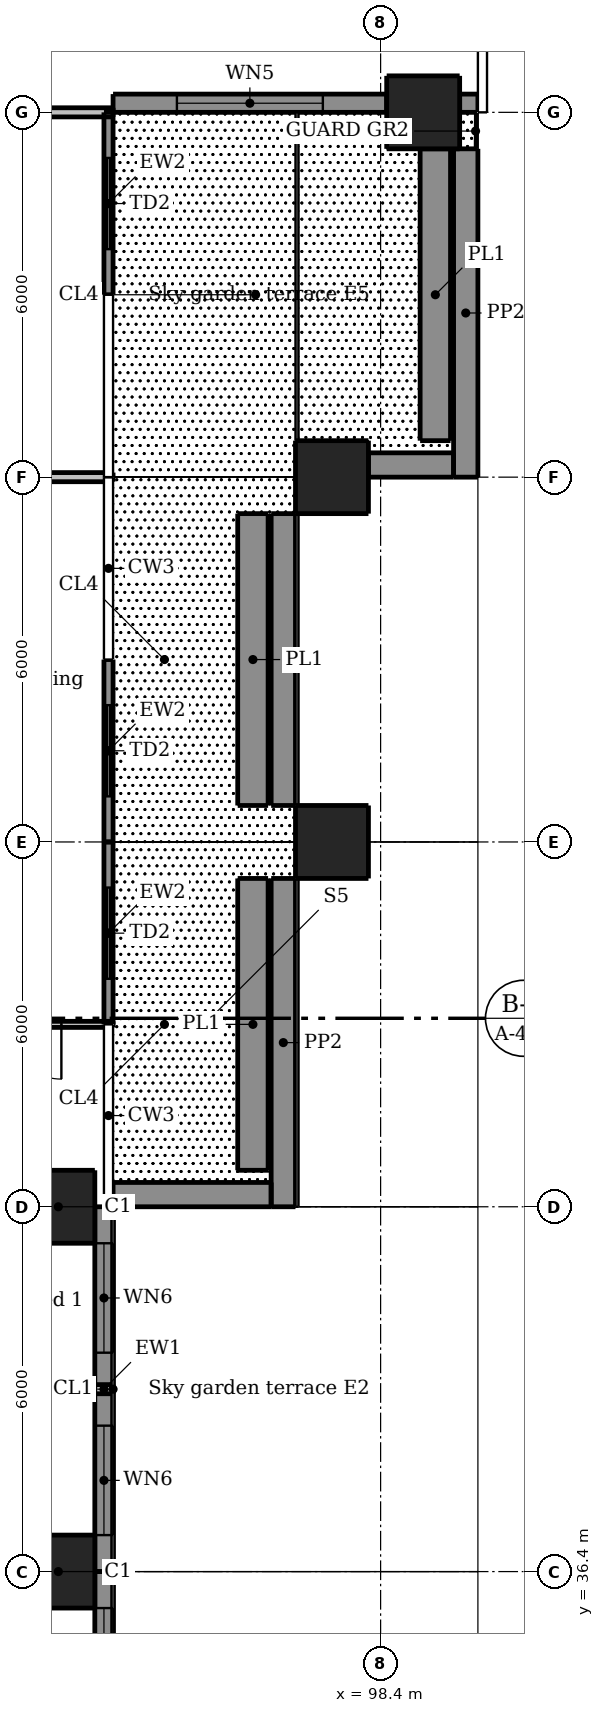
"""IFC4 building model, lengths in metres.
Left out: names, types, materials, properties, quantities, classifications, styles, units other than length and angle.
Written with IfcOpenShell. Run it as: python <this file> out.ifc"""

import sys

from ifc_helpers import new_model, si_unit, direction, frame, frame_2d, origin, origin_2d, place, context, subcontext, project, spatial, rectangle, extrude, element, fill, save


model = new_model("IFC4")
c1 = context("Model", 3, precision=1e-05, world=origin(), true_north=direction((0.0, 1.0)))
c2 = subcontext(c1, "Body", "Model", "MODEL_VIEW")
j1 = project(units=[si_unit("LENGTHUNIT", "METRE"), si_unit("PLANEANGLEUNIT", "RADIAN")], contexts=[c1])
p1 = place(None, origin())
s1 = spatial("IfcSite", under=j1, at=p1, CompositionType="ELEMENT")
p2 = place(p1, origin())
s2 = spatial("IfcBuilding", under=s1, at=p2, CompositionType="ELEMENT")
p3 = place(p2, frame((0.0, 0.0, 53.2)))
s3 = spatial("IfcBuildingStorey", under=s2, at=p3, CompositionType="ELEMENT", Elevation=53.2)
for number, where, z_axis, x_axis in (
    (1, (93.1, 36.4, 0.0), (0.0, 0.0, 1.0), (1.0, 0.0, 0.0)),
    (2, (93.1, 42.4, 0.0), (0.0, 0.0, 1.0), (1.0, 0.0, 0.0)),
):
    element("IfcColumn", number, at=place(p3, frame(where, z_axis=z_axis, x_axis=x_axis)), inside=s3, PredefinedType="COLUMN", context=c2, shape_type="SweptSolid", body=[
        extrude(rectangle(XDim=1.2, YDim=1.2, at=origin_2d()), origin(), (0.0, 0.0, 1.0), 3.05),
    ])
for number, where, z_axis, x_axis in (
    (3, (97.6, 48.4, 0.0), (0.0, 0.0, 1.0), (1.0, 0.0, 0.0)),
    (4, (97.6, 54.4, 0.0), (0.0, 0.0, 1.0), (1.0, 0.0, 0.0)),
):
    element("IfcColumn", number, at=place(p3, frame(where, z_axis=z_axis, x_axis=x_axis)), inside=s3, PredefinedType="COLUMN", context=c2, shape_type="SweptSolid", body=[
        extrude(rectangle(XDim=1.2, YDim=1.2, at=origin_2d()), origin(), (0.0, 0.0, 1.0), 3.3),
    ])
p4 = place(p3, frame((99.1, 60.4, 0.0), z_axis=(0.0, 0.0, 1.0), x_axis=(1.0, 0.0, 0.0)))
e5 = element("IfcColumn", 5, at=p4, inside=s3, PredefinedType="COLUMN", context=c2, shape_type="SweptSolid", body=[
    extrude(rectangle(XDim=1.2, YDim=1.2, at=origin_2d()), origin(), (0.0, 0.0, 1.0), 3.05),
])
p5 = place(p3, frame((94.0, 60.55, 0.0), z_axis=(0.0, 0.0, 1.0), x_axis=(1.0, 0.0, 0.0)))
e6 = element("IfcWall", 6, at=p5, inside=s3, PredefinedType="SOLIDWALL", context=c2, shape_type="SweptSolid", body=[
    extrude(rectangle(XDim=4.5, YDim=0.3, at=frame_2d((2.25, 0.0))), origin(), (0.0, 0.0, 1.0), 3.05),
])
p6 = place(p5, frame((1.05, 0.0, 0.15)))
e7 = element("IfcOpeningElement", 7, at=p6, cuts=e6, PredefinedType="OPENING", context=c2, shape_type="SweptSolid", body=[
    extrude(rectangle(XDim=2.4, YDim=2.1, at=frame_2d((1.2, 1.05))), frame((0.0, 0.16, 0.0), z_axis=(0.0, -1.0, 0.0), x_axis=(1.0, 0.0, 0.0)), (0.0, 0.0, 1.0), 0.32),
])
p7 = place(p3, frame((99.7, 60.55, 0.0), z_axis=(0.0, 0.0, 1.0), x_axis=(1.0, 0.0, 0.0)))
e8 = element("IfcWall", 8, at=p7, inside=s3, PredefinedType="SOLIDWALL", context=c2, shape_type="SweptSolid", body=[
    extrude(rectangle(XDim=0.3, YDim=0.3, at=frame_2d((0.15, 0.0))), origin(), (0.0, 0.0, 1.0), 3.05),
])
p8 = place(p3, frame((93.85, 30.1, 0.0), z_axis=(0.0, 0.0, 1.0), x_axis=(0.0, 1.0, 0.0)))
e9 = element("IfcWall", 9, at=p8, inside=s3, PredefinedType="SOLIDWALL", context=c2, shape_type="SweptSolid", body=[
    extrude(rectangle(XDim=6.3, YDim=0.3, at=frame_2d((3.15, 0.0))), origin(), (0.0, 0.0, 1.0), 3.05),
])
p9 = place(p8, frame((0.9, 0.0, 0.15)))
e10 = element("IfcOpeningElement", 10, at=p9, cuts=e9, PredefinedType="OPENING", context=c2, shape_type="SweptSolid", body=[
    extrude(rectangle(XDim=1.8, YDim=2.1, at=frame_2d((0.9, 1.05))), frame((0.0, 0.16, 0.0), z_axis=(0.0, -1.0, 0.0), x_axis=(1.0, 0.0, 0.0)), (0.0, 0.0, 1.0), 0.32),
])
p10 = place(p8, frame((3.9, 0.0, 0.15)))
e11 = element("IfcOpeningElement", 11, at=p10, cuts=e9, PredefinedType="OPENING", context=c2, shape_type="SweptSolid", body=[
    extrude(rectangle(XDim=1.8, YDim=2.1, at=frame_2d((0.9, 1.05))), frame((0.0, 0.16, 0.0), z_axis=(0.0, -1.0, 0.0), x_axis=(1.0, 0.0, 0.0)), (0.0, 0.0, 1.0), 0.32),
])
p11 = place(p3, frame((93.85, 36.4, 0.0), z_axis=(0.0, 0.0, 1.0), x_axis=(0.0, 1.0, 0.0)))
e12 = element("IfcWall", 12, at=p11, inside=s3, PredefinedType="SOLIDWALL", context=c2, shape_type="SweptSolid", body=[
    extrude(rectangle(XDim=6.0, YDim=0.3, at=frame_2d((3.0, 0.0))), origin(), (0.0, 0.0, 1.0), 3.05),
])
p12 = place(p11, frame((0.6, 0.0, 0.15)))
e13 = element("IfcOpeningElement", 13, at=p12, cuts=e12, PredefinedType="OPENING", context=c2, shape_type="SweptSolid", body=[
    extrude(rectangle(XDim=1.8, YDim=2.1, at=frame_2d((0.9, 1.05))), frame((0.0, 0.16, 0.0), z_axis=(0.0, -1.0, 0.0), x_axis=(1.0, 0.0, 0.0)), (0.0, 0.0, 1.0), 0.32),
])
p13 = place(p11, frame((3.6, 0.0, 0.15)))
e14 = element("IfcOpeningElement", 14, at=p13, cuts=e12, PredefinedType="OPENING", context=c2, shape_type="SweptSolid", body=[
    extrude(rectangle(XDim=1.8, YDim=2.1, at=frame_2d((0.9, 1.05))), frame((0.0, 0.16, 0.0), z_axis=(0.0, -1.0, 0.0), x_axis=(1.0, 0.0, 0.0)), (0.0, 0.0, 1.0), 0.32),
])
p14 = place(p3, frame((93.925, 45.4, 0.0), z_axis=(0.0, 0.0, 1.0), x_axis=(0.0, 1.0, 0.0)))
e15 = element("IfcWall", 15, at=p14, inside=s3, PredefinedType="SOLIDWALL", context=c2, shape_type="SweptSolid", body=[
    extrude(rectangle(XDim=3.0, YDim=0.15, at=frame_2d((1.5, 0.0))), origin(), (0.0, 0.0, 1.0), 3.05),
])
p15 = place(p14, frame((0.75, 0.0, 0.0)))
e16 = element("IfcOpeningElement", 16, at=p15, cuts=e15, PredefinedType="OPENING", context=c2, shape_type="SweptSolid", body=[
    extrude(rectangle(XDim=1.5, YDim=2.4, at=frame_2d((0.75, 1.2))), frame((0.0, 0.085, 0.0), z_axis=(0.0, -1.0, 0.0), x_axis=(1.0, 0.0, 0.0)), (0.0, 0.0, 1.0), 0.17),
])
p16 = place(p3, frame((93.925, 48.4, 0.0), z_axis=(0.0, 0.0, 1.0), x_axis=(0.0, 1.0, 0.0)))
e17 = element("IfcWall", 17, at=p16, inside=s3, PredefinedType="SOLIDWALL", context=c2, shape_type="SweptSolid", body=[
    extrude(rectangle(XDim=3.0, YDim=0.15, at=frame_2d((1.5, 0.0))), origin(), (0.0, 0.0, 1.0), 3.05),
])
p17 = place(p16, frame((0.75, 0.0, 0.0)))
e18 = element("IfcOpeningElement", 18, at=p17, cuts=e17, PredefinedType="OPENING", context=c2, shape_type="SweptSolid", body=[
    extrude(rectangle(XDim=1.5, YDim=2.4, at=frame_2d((0.75, 1.2))), frame((0.0, 0.085, 0.0), z_axis=(0.0, -1.0, 0.0), x_axis=(1.0, 0.0, 0.0)), (0.0, 0.0, 1.0), 0.17),
])
p18 = place(p3, frame((93.925, 57.4, 0.0), z_axis=(0.0, 0.0, 1.0), x_axis=(0.0, 1.0, 0.0)))
e19 = element("IfcWall", 19, at=p18, inside=s3, PredefinedType="SOLIDWALL", context=c2, shape_type="SweptSolid", body=[
    extrude(rectangle(XDim=3.0, YDim=0.15, at=frame_2d((1.5, 0.0))), origin(), (0.0, 0.0, 1.0), 3.05),
])
p19 = place(p18, frame((0.75, 0.0, 0.0)))
e20 = element("IfcOpeningElement", 20, at=p19, cuts=e19, PredefinedType="OPENING", context=c2, shape_type="SweptSolid", body=[
    extrude(rectangle(XDim=1.5, YDim=2.4, at=frame_2d((0.75, 1.2))), frame((0.0, 0.085, 0.0), z_axis=(0.0, -1.0, 0.0), x_axis=(1.0, 0.0, 0.0)), (0.0, 0.0, 1.0), 0.17),
])
p20 = place(p3, frame((96.8, 42.4, 0.03), z_axis=(0.0, 0.0, 1.0), x_axis=(0.0, 1.0, 0.0)))
e21 = element("IfcWall", 21, at=p20, inside=s3, PredefinedType="PARAPET", context=c2, shape_type="SweptSolid", body=[
    extrude(rectangle(XDim=5.4, YDim=0.4, at=frame_2d((2.7, 0.0))), origin(), (0.0, 0.0, 1.0), 1.1),
])
p21 = place(p3, frame((94.0, 42.6, 0.03), z_axis=(0.0, 0.0, 1.0), x_axis=(1.0, 0.0, 0.0)))
e22 = element("IfcWall", 22, at=p21, inside=s3, PredefinedType="PARAPET", context=c2, shape_type="SweptSolid", body=[
    extrude(rectangle(XDim=2.6, YDim=0.4, at=frame_2d((1.3, 0.0))), origin(), (0.0, 0.0, 1.0), 1.1),
])
p22 = place(p3, frame((96.3, 43.0, 0.03), z_axis=(0.0, 0.0, 1.0), x_axis=(0.0, 1.0, 0.0)))
e23 = element("IfcWall", 23, at=p22, inside=s3, PredefinedType="SOLIDWALL", context=c2, shape_type="SweptSolid", body=[
    extrude(rectangle(XDim=4.8, YDim=0.5, at=frame_2d((2.4, 0.0))), origin(), (0.0, 0.0, 1.0), 0.6),
])
p23 = place(p3, frame((96.8, 49.0, 0.03), z_axis=(0.0, 0.0, 1.0), x_axis=(0.0, 1.0, 0.0)))
e24 = element("IfcWall", 24, at=p23, inside=s3, PredefinedType="PARAPET", context=c2, shape_type="SweptSolid", body=[
    extrude(rectangle(XDim=4.8, YDim=0.4, at=frame_2d((2.4, 0.0))), origin(), (0.0, 0.0, 1.0), 1.1),
])
p24 = place(p3, frame((96.3, 49.0, 0.03), z_axis=(0.0, 0.0, 1.0), x_axis=(0.0, 1.0, 0.0)))
e25 = element("IfcWall", 25, at=p24, inside=s3, PredefinedType="SOLIDWALL", context=c2, shape_type="SweptSolid", body=[
    extrude(rectangle(XDim=4.8, YDim=0.5, at=frame_2d((2.4, 0.0))), origin(), (0.0, 0.0, 1.0), 0.6),
])
p25 = place(p3, frame((99.8, 54.4, 0.03), z_axis=(0.0, 0.0, 1.0), x_axis=(0.0, 1.0, 0.0)))
e26 = element("IfcWall", 26, at=p25, inside=s3, PredefinedType="PARAPET", context=c2, shape_type="SweptSolid", body=[
    extrude(rectangle(XDim=5.4, YDim=0.4, at=frame_2d((2.7, 0.0))), origin(), (0.0, 0.0, 1.0), 1.1),
])
p26 = place(p3, frame((98.2, 54.6, 0.03), z_axis=(0.0, 0.0, 1.0), x_axis=(1.0, 0.0, 0.0)))
e27 = element("IfcWall", 27, at=p26, inside=s3, PredefinedType="PARAPET", context=c2, shape_type="SweptSolid", body=[
    extrude(rectangle(XDim=1.4, YDim=0.4, at=frame_2d((0.7, 0.0))), origin(), (0.0, 0.0, 1.0), 1.1),
])
p27 = place(p3, frame((99.3, 55.0, 0.03), z_axis=(0.0, 0.0, 1.0), x_axis=(0.0, 1.0, 0.0)))
e28 = element("IfcWall", 28, at=p27, inside=s3, PredefinedType="SOLIDWALL", context=c2, shape_type="SweptSolid", body=[
    extrude(rectangle(XDim=4.8, YDim=0.5, at=frame_2d((2.4, 0.0))), origin(), (0.0, 0.0, 1.0), 0.6),
])
p28 = place(p3, frame((94.0, 45.4, 0.0), z_axis=(0.0, 0.0, 1.0), x_axis=(-1.0, 0.0, 0.0)))
e29 = element("IfcWall", 29, at=p28, inside=s3, PredefinedType="PARTITIONING", context=c2, shape_type="SweptSolid", body=[
    extrude(rectangle(XDim=5.625, YDim=0.1, at=frame_2d((2.812, 0.0))), origin(), (0.0, 0.0, 1.0), 3.05),
])
p29 = place(p28, frame((0.85, 0.0, 0.0)))
e30 = element("IfcOpeningElement", 30, at=p29, cuts=e29, PredefinedType="OPENING", context=c2, shape_type="SweptSolid", body=[
    extrude(rectangle(XDim=0.9, YDim=2.1, at=frame_2d((0.45, 1.05))), frame((0.0, 0.06, 0.0), z_axis=(0.0, -1.0, 0.0), x_axis=(1.0, 0.0, 0.0)), (0.0, 0.0, 1.0), 0.12),
])
p30 = place(p28, frame((3.75, 0.0, 0.0)))
e31 = element("IfcOpeningElement", 31, at=p30, cuts=e29, PredefinedType="OPENING", context=c2, shape_type="SweptSolid", body=[
    extrude(rectangle(XDim=0.8, YDim=2.1, at=frame_2d((0.4, 1.05))), frame((0.0, 0.06, 0.0), z_axis=(0.0, -1.0, 0.0), x_axis=(1.0, 0.0, 0.0)), (0.0, 0.0, 1.0), 0.12),
])
for number, where, z_axis, x_axis in (
    (32, (88.375, 60.4, 0.0), (0.0, 0.0, 1.0), (1.0, 0.0, 0.0)),
    (33, (88.375, 54.4, 0.0), (0.0, 0.0, 1.0), (1.0, 0.0, 0.0)),
):
    element("IfcWall", number, at=place(p3, frame(where, z_axis=z_axis, x_axis=x_axis)), inside=s3, PredefinedType="PARTITIONING", context=c2, shape_type="SweptSolid", body=[
        extrude(rectangle(XDim=5.625, YDim=0.15, at=frame_2d((2.812, 0.0))), origin(), (0.0, 0.0, 1.0), 2.516),
    ])
p31 = place(p3, frame((88.375, 39.4, 0.0), z_axis=(0.0, 0.0, 1.0), x_axis=(1.0, 0.0, 0.0)))
e34 = element("IfcWall", 34, at=p31, inside=s3, PredefinedType="PARTITIONING", context=c2, shape_type="SweptSolid", body=[
    extrude(rectangle(XDim=5.625, YDim=0.15, at=frame_2d((2.812, 0.0))), origin(), (0.0, 0.0, 1.0), 3.05),
])
p32 = place(p6, origin())
e35 = element("IfcWindow", 35, at=p32, inside=s3, PartitioningType="DOUBLE_PANEL_VERTICAL", PredefinedType="WINDOW", context=c2, shape_type="SweptSolid", body=[
    extrude(rectangle(XDim=2.4, YDim=2.1, at=frame_2d((1.2, 1.05))), frame((0.0, 0.03, 0.0), z_axis=(0.0, -1.0, 0.0), x_axis=(1.0, 0.0, 0.0)), (0.0, 0.0, 1.0), 0.06),
])
fill(e7, e35)
p33 = place(p10, origin())
e36 = element("IfcWindow", 36, at=p33, inside=s3, PartitioningType="DOUBLE_PANEL_VERTICAL", PredefinedType="WINDOW", context=c2, shape_type="SweptSolid", body=[
    extrude(rectangle(XDim=1.8, YDim=2.1, at=frame_2d((0.9, 1.05))), frame((0.0, 0.03, 0.0), z_axis=(0.0, -1.0, 0.0), x_axis=(1.0, 0.0, 0.0)), (0.0, 0.0, 1.0), 0.06),
])
fill(e11, e36)
p34 = place(p12, origin())
e37 = element("IfcWindow", 37, at=p34, inside=s3, PartitioningType="DOUBLE_PANEL_VERTICAL", PredefinedType="WINDOW", context=c2, shape_type="SweptSolid", body=[
    extrude(rectangle(XDim=1.8, YDim=2.1, at=frame_2d((0.9, 1.05))), frame((0.0, 0.03, 0.0), z_axis=(0.0, -1.0, 0.0), x_axis=(1.0, 0.0, 0.0)), (0.0, 0.0, 1.0), 0.06),
])
fill(e13, e37)
p35 = place(p13, origin())
e38 = element("IfcWindow", 38, at=p35, inside=s3, PartitioningType="DOUBLE_PANEL_VERTICAL", PredefinedType="WINDOW", context=c2, shape_type="SweptSolid", body=[
    extrude(rectangle(XDim=1.8, YDim=2.1, at=frame_2d((0.9, 1.05))), frame((0.0, 0.03, 0.0), z_axis=(0.0, -1.0, 0.0), x_axis=(1.0, 0.0, 0.0)), (0.0, 0.0, 1.0), 0.06),
])
fill(e14, e38)
p36 = place(p15, origin())
e39 = element("IfcDoor", 39, at=p36, inside=s3, OperationType="DOUBLE_DOOR_SLIDING", PredefinedType="DOOR", context=c2, shape_type="SweptSolid", body=[
    extrude(rectangle(XDim=1.5, YDim=2.4, at=frame_2d((0.75, 1.2))), frame((0.0, 0.025, 0.0), z_axis=(0.0, -1.0, 0.0), x_axis=(1.0, 0.0, 0.0)), (0.0, 0.0, 1.0), 0.05),
])
fill(e16, e39)
p37 = place(p17, origin())
e40 = element("IfcDoor", 40, at=p37, inside=s3, OperationType="DOUBLE_DOOR_SLIDING", PredefinedType="DOOR", context=c2, shape_type="SweptSolid", body=[
    extrude(rectangle(XDim=1.5, YDim=2.4, at=frame_2d((0.75, 1.2))), frame((0.0, 0.025, 0.0), z_axis=(0.0, -1.0, 0.0), x_axis=(1.0, 0.0, 0.0)), (0.0, 0.0, 1.0), 0.05),
])
fill(e18, e40)
p38 = place(p19, origin())
e41 = element("IfcDoor", 41, at=p38, inside=s3, OperationType="DOUBLE_DOOR_SLIDING", PredefinedType="DOOR", context=c2, shape_type="SweptSolid", body=[
    extrude(rectangle(XDim=1.5, YDim=2.4, at=frame_2d((0.75, 1.2))), frame((0.0, 0.025, 0.0), z_axis=(0.0, -1.0, 0.0), x_axis=(1.0, 0.0, 0.0)), (0.0, 0.0, 1.0), 0.05),
])
fill(e20, e41)
p39 = place(p29, origin())
e42 = element("IfcDoor", 42, at=p39, inside=s3, OperationType="SINGLE_SWING_LEFT", PredefinedType="DOOR", context=c2, shape_type="SweptSolid", body=[
    extrude(rectangle(XDim=0.9, YDim=2.1, at=frame_2d((0.45, 1.05))), frame((0.0, 0.025, 0.0), z_axis=(0.0, -1.0, 0.0), x_axis=(1.0, 0.0, 0.0)), (0.0, 0.0, 1.0), 0.05),
])
fill(e30, e42)
save(model, sys.argv[1])
